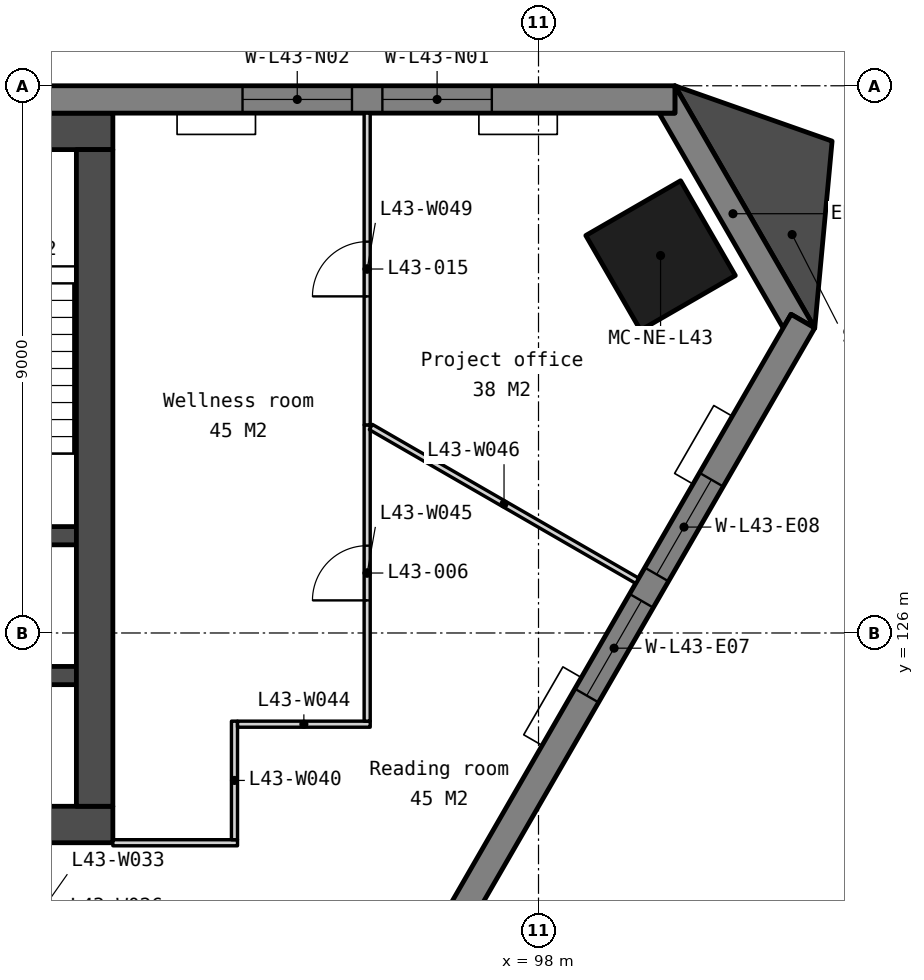
"""IFC4 building model, lengths in metres.
Left out: names, types, materials, properties, quantities, classifications, styles, units other than length and angle.
Written with IfcOpenShell. Run it as: python <this file> out.ifc"""

import sys

from ifc_helpers import new_model, si_unit, direction, frame, frame_2d, origin, origin_2d, place, context, subcontext, project, spatial, polyline, rectangle, outline, extrude, element, fill, save


model = new_model("IFC4")
c1 = context("Model", 3, precision=1e-05, world=origin(), true_north=direction((0.0, 1.0)))
c2 = subcontext(c1, "Body", "Model", "MODEL_VIEW")
j1 = project(units=[si_unit("LENGTHUNIT", "METRE"), si_unit("PLANEANGLEUNIT", "RADIAN")], contexts=[c1])
p1 = place(None, origin())
s1 = spatial("IfcSite", under=j1, at=p1, CompositionType="ELEMENT")
p2 = place(p1, origin())
s2 = spatial("IfcBuilding", under=s1, at=p2, CompositionType="ELEMENT")
p3 = place(p2, frame((0.0, 0.0, 171.5)))
s3 = spatial("IfcBuildingStorey", under=s2, at=p3, CompositionType="ELEMENT", Elevation=171.5)
p4 = place(p3, frame((100.007, 132.208, 0.0), z_axis=(0.0, 0.0, 1.0), x_axis=(-0.5, 0.866025403784, 0.0)))
e1 = element("IfcColumn", 1, at=p4, inside=s3, PredefinedType="COLUMN", context=c2, shape_type="SweptSolid", body=[
    extrude(rectangle(XDim=1.8, YDim=1.8, at=origin_2d()), origin(), (0.0, 0.0, 1.0), 3.9),
])
p5 = place(p3, frame((69.0, 134.25, 0.0), z_axis=(0.0, 0.0, 1.0), x_axis=(1.0, 0.0, 0.0)))
e2 = element("IfcWall", 2, at=p5, inside=s3, PredefinedType="SOLIDWALL", context=c2, shape_type="SweptSolid", body=[
    extrude(rectangle(XDim=22.0, YDim=0.6, at=frame_2d((11.0, 0.0))), origin(), (0.0, 0.0, 1.0), 3.65),
])
p6 = place(p3, frame((69.0, 122.85, 0.0), z_axis=(0.0, 0.0, 1.0), x_axis=(1.0, 0.0, 0.0)))
e3 = element("IfcWall", 3, at=p6, inside=s3, PredefinedType="SOLIDWALL", context=c2, shape_type="SweptSolid", body=[
    extrude(rectangle(XDim=22.0, YDim=0.6, at=frame_2d((11.0, 0.0))), origin(), (0.0, 0.0, 1.0), 3.65),
])
p7 = place(p6, frame((16.375, 0.0, 0.0)))
e4 = element("IfcOpeningElement", 4, at=p7, cuts=e3, PredefinedType="OPENING", context=c2, shape_type="SweptSolid", body=[
    extrude(rectangle(XDim=1.8, YDim=2.1, at=frame_2d((0.9, 1.05))), frame((0.0, 0.31, 0.0), z_axis=(0.0, -1.0, 0.0), x_axis=(1.0, 0.0, 0.0)), (0.0, 0.0, 1.0), 0.62),
])
p8 = place(p6, frame((3.825, 0.0, 0.0)))
e5 = element("IfcOpeningElement", 5, at=p8, cuts=e3, PredefinedType="OPENING", context=c2, shape_type="SweptSolid", body=[
    extrude(rectangle(XDim=1.8, YDim=2.1, at=frame_2d((0.9, 1.05))), frame((0.0, 0.31, 0.0), z_axis=(0.0, -1.0, 0.0), x_axis=(1.0, 0.0, 0.0)), (0.0, 0.0, 1.0), 0.62),
])
p9 = place(p6, frame((12.85, 0.0, 0.0)))
e6 = element("IfcOpeningElement", 6, at=p9, cuts=e3, PredefinedType="OPENING", context=c2, shape_type="SweptSolid", body=[
    extrude(rectangle(XDim=1.5, YDim=2.1, at=frame_2d((0.75, 1.05))), frame((0.0, 0.31, 0.0), z_axis=(0.0, -1.0, 0.0), x_axis=(1.0, 0.0, 0.0)), (0.0, 0.0, 1.0), 0.62),
])
for number, where, z_axis, x_axis in (
    (7, (87.85, 127.6, 0.0), (0.0, 0.0, 1.0), (1.0, 0.0, 0.0)),
    (8, (87.85, 125.3, 0.0), (0.0, 0.0, 1.0), (1.0, 0.0, 0.0)),
):
    element("IfcWall", number, at=place(p3, frame(where, z_axis=z_axis, x_axis=x_axis)), inside=s3, PredefinedType="SOLIDWALL", context=c2, shape_type="SweptSolid", body=[
        extrude(rectangle(XDim=2.55, YDim=0.3, at=frame_2d((1.275, 0.0))), origin(), (0.0, 0.0, 1.0), 3.65),
    ])
p10 = place(p3, frame((90.7, 133.95, 0.0), z_axis=(0.0, 0.0, 1.0), x_axis=(0.0, -1.0, 0.0)))
e9 = element("IfcWall", 9, at=p10, inside=s3, PredefinedType="SOLIDWALL", context=c2, shape_type="SweptSolid", body=[
    extrude(rectangle(XDim=10.8, YDim=0.6, at=frame_2d((5.4, 0.0))), origin(), (0.0, 0.0, 1.0), 3.65),
])
p11 = place(p3, frame((0.0, 0.0, -0.15)))
e10 = element("IfcWall", 10, at=p11, inside=s3, PredefinedType="SOLIDWALL", context=c2, shape_type="SweptSolid", body=[
    extrude(outline(polyline([(102.543, 131.016), (102.153, 131.241), (102.023, 131.016), (99.983, 134.55), (100.243, 134.55), (100.243, 135.0), (102.543, 131.016)])), origin(), (0.0, 0.0, 1.0), 3.8),
])
p12 = place(p3, frame((100.243, 134.775, -0.15), z_axis=(0.0, 0.0, 1.0), x_axis=(-1.0, 0.0, 0.0)))
e11 = element("IfcWall", 11, at=p12, inside=s3, PredefinedType="SOLIDWALL", context=c2, shape_type="SweptSolid", body=[
    extrude(outline(polyline([(40.486, 0.0), (40.486, 3.8), (0.0, 3.8), (0.0, 0.0), (40.486, 0.0)])), frame((0.0, 0.225, 0.0), z_axis=(0.0, -1.0, 0.0), x_axis=(1.0, 0.0, 0.0)), (0.0, 0.0, 1.0), 0.45),
])
p13 = place(p12, frame((3.011, 0.0, 0.95)))
e12 = element("IfcOpeningElement", 12, at=p13, cuts=e11, PredefinedType="OPENING", context=c2, shape_type="SweptSolid", body=[
    extrude(rectangle(XDim=1.8, YDim=2.2, at=frame_2d((0.9, 1.1))), frame((0.0, 0.235, 0.0), z_axis=(0.0, -1.0, 0.0), x_axis=(1.0, 0.0, 0.0)), (0.0, 0.0, 1.0), 0.47),
])
p14 = place(p12, frame((5.311, 0.0, 0.95)))
e13 = element("IfcOpeningElement", 13, at=p14, cuts=e11, PredefinedType="OPENING", context=c2, shape_type="SweptSolid", body=[
    extrude(rectangle(XDim=1.8, YDim=2.2, at=frame_2d((0.9, 1.1))), frame((0.0, 0.235, 0.0), z_axis=(0.0, -1.0, 0.0), x_axis=(1.0, 0.0, 0.0)), (0.0, 0.0, 1.0), 0.47),
])
p15 = place(p12, frame((13.132, 0.0, 0.95)))
e14 = element("IfcOpeningElement", 14, at=p15, cuts=e11, PredefinedType="OPENING", context=c2, shape_type="SweptSolid", body=[
    extrude(rectangle(XDim=1.8, YDim=2.2, at=frame_2d((0.9, 1.1))), frame((0.0, 0.235, 0.0), z_axis=(0.0, -1.0, 0.0), x_axis=(1.0, 0.0, 0.0)), (0.0, 0.0, 1.0), 0.47),
])
p16 = place(p12, frame((15.432, 0.0, 0.95)))
e15 = element("IfcOpeningElement", 15, at=p16, cuts=e11, PredefinedType="OPENING", context=c2, shape_type="SweptSolid", body=[
    extrude(rectangle(XDim=1.8, YDim=2.2, at=frame_2d((0.9, 1.1))), frame((0.0, 0.235, 0.0), z_axis=(0.0, -1.0, 0.0), x_axis=(1.0, 0.0, 0.0)), (0.0, 0.0, 1.0), 0.47),
])
p17 = place(p12, frame((23.254, 0.0, 0.95)))
e16 = element("IfcOpeningElement", 16, at=p17, cuts=e11, PredefinedType="OPENING", context=c2, shape_type="SweptSolid", body=[
    extrude(rectangle(XDim=1.8, YDim=2.2, at=frame_2d((0.9, 1.1))), frame((0.0, 0.235, 0.0), z_axis=(0.0, -1.0, 0.0), x_axis=(1.0, 0.0, 0.0)), (0.0, 0.0, 1.0), 0.47),
])
p18 = place(p12, frame((25.554, 0.0, 0.95)))
e17 = element("IfcOpeningElement", 17, at=p18, cuts=e11, PredefinedType="OPENING", context=c2, shape_type="SweptSolid", body=[
    extrude(rectangle(XDim=1.8, YDim=2.2, at=frame_2d((0.9, 1.1))), frame((0.0, 0.235, 0.0), z_axis=(0.0, -1.0, 0.0), x_axis=(1.0, 0.0, 0.0)), (0.0, 0.0, 1.0), 0.47),
])
p19 = place(p12, frame((33.375, 0.0, 0.95)))
e18 = element("IfcOpeningElement", 18, at=p19, cuts=e11, PredefinedType="OPENING", context=c2, shape_type="SweptSolid", body=[
    extrude(rectangle(XDim=1.8, YDim=2.2, at=frame_2d((0.9, 1.1))), frame((0.0, 0.235, 0.0), z_axis=(0.0, -1.0, 0.0), x_axis=(1.0, 0.0, 0.0)), (0.0, 0.0, 1.0), 0.47),
])
p20 = place(p12, frame((35.675, 0.0, 0.95)))
e19 = element("IfcOpeningElement", 19, at=p20, cuts=e11, PredefinedType="OPENING", context=c2, shape_type="SweptSolid", body=[
    extrude(rectangle(XDim=1.8, YDim=2.2, at=frame_2d((0.9, 1.1))), frame((0.0, 0.235, 0.0), z_axis=(0.0, -1.0, 0.0), x_axis=(1.0, 0.0, 0.0)), (0.0, 0.0, 1.0), 0.47),
])
p21 = place(p3, frame((82.105, 96.067, -0.15), z_axis=(0.0, 0.0, 1.0), x_axis=(0.499997369791, 0.866026922331, 0.0)))
e20 = element("IfcWall", 20, at=p21, inside=s3, PredefinedType="SOLIDWALL", context=c2, shape_type="SweptSolid", body=[
    extrude(outline(polyline([(40.486, 0.0), (40.486, 3.8), (0.0, 3.8), (0.0, 0.0), (40.486, 0.0)])), frame((0.0, 0.225, 0.0), z_axis=(0.0, -1.0, 0.0), x_axis=(1.0, 0.0, 0.0)), (0.0, 0.0, 1.0), 0.45),
])
p22 = place(p21, frame((3.011, 0.0, 0.95)))
e21 = element("IfcOpeningElement", 21, at=p22, cuts=e20, PredefinedType="OPENING", context=c2, shape_type="SweptSolid", body=[
    extrude(rectangle(XDim=1.8, YDim=2.2, at=frame_2d((0.9, 1.1))), frame((0.0, 0.235, 0.0), z_axis=(0.0, -1.0, 0.0), x_axis=(1.0, 0.0, 0.0)), (0.0, 0.0, 1.0), 0.47),
])
p23 = place(p21, frame((5.311, 0.0, 0.95)))
e22 = element("IfcOpeningElement", 22, at=p23, cuts=e20, PredefinedType="OPENING", context=c2, shape_type="SweptSolid", body=[
    extrude(rectangle(XDim=1.8, YDim=2.2, at=frame_2d((0.9, 1.1))), frame((0.0, 0.235, 0.0), z_axis=(0.0, -1.0, 0.0), x_axis=(1.0, 0.0, 0.0)), (0.0, 0.0, 1.0), 0.47),
])
p24 = place(p21, frame((13.132, 0.0, 0.95)))
e23 = element("IfcOpeningElement", 23, at=p24, cuts=e20, PredefinedType="OPENING", context=c2, shape_type="SweptSolid", body=[
    extrude(rectangle(XDim=1.8, YDim=2.2, at=frame_2d((0.9, 1.1))), frame((0.0, 0.235, 0.0), z_axis=(0.0, -1.0, 0.0), x_axis=(1.0, 0.0, 0.0)), (0.0, 0.0, 1.0), 0.47),
])
p25 = place(p21, frame((15.432, 0.0, 0.95)))
e24 = element("IfcOpeningElement", 24, at=p25, cuts=e20, PredefinedType="OPENING", context=c2, shape_type="SweptSolid", body=[
    extrude(rectangle(XDim=1.8, YDim=2.2, at=frame_2d((0.9, 1.1))), frame((0.0, 0.235, 0.0), z_axis=(0.0, -1.0, 0.0), x_axis=(1.0, 0.0, 0.0)), (0.0, 0.0, 1.0), 0.47),
])
p26 = place(p21, frame((23.254, 0.0, 0.95)))
e25 = element("IfcOpeningElement", 25, at=p26, cuts=e20, PredefinedType="OPENING", context=c2, shape_type="SweptSolid", body=[
    extrude(rectangle(XDim=1.8, YDim=2.2, at=frame_2d((0.9, 1.1))), frame((0.0, 0.235, 0.0), z_axis=(0.0, -1.0, 0.0), x_axis=(1.0, 0.0, 0.0)), (0.0, 0.0, 1.0), 0.47),
])
p27 = place(p21, frame((25.554, 0.0, 0.95)))
e26 = element("IfcOpeningElement", 26, at=p27, cuts=e20, PredefinedType="OPENING", context=c2, shape_type="SweptSolid", body=[
    extrude(rectangle(XDim=1.8, YDim=2.2, at=frame_2d((0.9, 1.1))), frame((0.0, 0.235, 0.0), z_axis=(0.0, -1.0, 0.0), x_axis=(1.0, 0.0, 0.0)), (0.0, 0.0, 1.0), 0.47),
])
p28 = place(p21, frame((33.375, 0.0, 0.95)))
e27 = element("IfcOpeningElement", 27, at=p28, cuts=e20, PredefinedType="OPENING", context=c2, shape_type="SweptSolid", body=[
    extrude(rectangle(XDim=1.8, YDim=2.2, at=frame_2d((0.9, 1.1))), frame((0.0, 0.235, 0.0), z_axis=(0.0, -1.0, 0.0), x_axis=(1.0, 0.0, 0.0)), (0.0, 0.0, 1.0), 0.47),
])
p29 = place(p21, frame((35.675, 0.0, 0.95)))
e28 = element("IfcOpeningElement", 28, at=p29, cuts=e20, PredefinedType="OPENING", context=c2, shape_type="SweptSolid", body=[
    extrude(rectangle(XDim=1.8, YDim=2.2, at=frame_2d((0.9, 1.1))), frame((0.0, 0.235, 0.0), z_axis=(0.0, -1.0, 0.0), x_axis=(1.0, 0.0, 0.0)), (0.0, 0.0, 1.0), 0.47),
])
p30 = place(p3, frame((0.0, 0.0, -0.15)))
e29 = element("IfcWall", 29, at=p30, inside=s3, PredefinedType="SOLIDWALL", context=c2, shape_type="SweptSolid", body=[
    extrude(outline(polyline([(102.543, 131.016), (102.828, 134.09), (100.243, 135.0), (102.543, 131.016)])), origin(), (0.0, 0.0, 1.0), 3.8),
])
p31 = place(p3, frame((87.557, 122.137, 0.0), z_axis=(0.0, 0.0, 1.0), x_axis=(0.866029768103, -0.499992440702, 0.0)))
e30 = element("IfcWall", 30, at=p31, inside=s3, PredefinedType="PARTITIONING", context=c2, shape_type="SweptSolid", body=[
    extrude(rectangle(XDim=8.089, YDim=0.1, at=frame_2d((4.044, 0.0))), origin(), (0.0, 0.0, 1.0), 3.65),
])
p32 = place(p31, frame((3.594, 0.0, 0.0)))
e31 = element("IfcOpeningElement", 31, at=p32, cuts=e30, PredefinedType="OPENING", context=c2, shape_type="SweptSolid", body=[
    extrude(rectangle(XDim=0.9, YDim=2.1, at=frame_2d((0.45, 1.05))), frame((0.0, 0.06, 0.0), z_axis=(0.0, -1.0, 0.0), x_axis=(1.0, 0.0, 0.0)), (0.0, 0.0, 1.0), 0.12),
])
p33 = place(p3, frame((91.0, 122.55, 0.0), z_axis=(0.0, 0.0, 1.0), x_axis=(1.0, 0.0, 0.0)))
e32 = element("IfcWall", 32, at=p33, inside=s3, PredefinedType="PARTITIONING", context=c2, shape_type="SweptSolid", body=[
    extrude(rectangle(XDim=2.05, YDim=0.1, at=frame_2d((1.025, 0.0))), origin(), (0.0, 0.0, 1.0), 3.65),
])
p34 = place(p3, frame((93.0, 122.6, 0.0), z_axis=(0.0, 0.0, 1.0), x_axis=(0.0, 1.0, 0.0)))
e33 = element("IfcWall", 33, at=p34, inside=s3, PredefinedType="PARTITIONING", context=c2, shape_type="SweptSolid", body=[
    extrude(rectangle(XDim=1.95, YDim=0.1, at=frame_2d((0.975, 0.0))), origin(), (0.0, 0.0, 1.0), 3.65),
])
p35 = place(p3, frame((93.05, 124.5, 0.0), z_axis=(0.0, 0.0, 1.0), x_axis=(1.0, 0.0, 0.0)))
e34 = element("IfcWall", 34, at=p35, inside=s3, PredefinedType="PARTITIONING", context=c2, shape_type="SweptSolid", body=[
    extrude(rectangle(XDim=2.182, YDim=0.1, at=frame_2d((1.091, 0.0))), origin(), (0.0, 0.0, 1.0), 3.65),
])
p36 = place(p3, frame((95.182, 124.55, 0.0), z_axis=(0.0, 0.0, 1.0), x_axis=(0.0, 1.0, 0.0)))
e35 = element("IfcWall", 35, at=p36, inside=s3, PredefinedType="PARTITIONING", context=c2, shape_type="SweptSolid", body=[
    extrude(rectangle(XDim=4.872, YDim=0.1, at=frame_2d((2.436, 0.0))), origin(), (0.0, 0.0, 1.0), 3.65),
])
p37 = place(p36, frame((1.986, 0.0, 0.0)))
e36 = element("IfcOpeningElement", 36, at=p37, cuts=e35, PredefinedType="OPENING", context=c2, shape_type="SweptSolid", body=[
    extrude(rectangle(XDim=0.9, YDim=2.1, at=frame_2d((0.45, 1.05))), frame((0.0, 0.06, 0.0), z_axis=(0.0, -1.0, 0.0), x_axis=(1.0, 0.0, 0.0)), (0.0, 0.0, 1.0), 0.12),
])
p38 = place(p3, frame((95.243, 129.387, 0.0), z_axis=(0.0, 0.0, 1.0), x_axis=(0.866030444867, -0.499991268487, 0.0)))
e37 = element("IfcWall", 37, at=p38, inside=s3, PredefinedType="PARTITIONING", context=c2, shape_type="SweptSolid", body=[
    extrude(rectangle(XDim=5.058, YDim=0.1, at=frame_2d((2.529, 0.0))), origin(), (0.0, 0.0, 1.0), 3.65),
])
p39 = place(p3, frame((95.182, 129.422, 0.0), z_axis=(0.0, 0.0, 1.0), x_axis=(0.0, 1.0, 0.0)))
e38 = element("IfcWall", 38, at=p39, inside=s3, PredefinedType="PARTITIONING", context=c2, shape_type="SweptSolid", body=[
    extrude(rectangle(XDim=5.128, YDim=0.1, at=frame_2d((2.564, 0.0))), origin(), (0.0, 0.0, 1.0), 3.65),
])
p40 = place(p39, frame((2.114, 0.0, 0.0)))
e39 = element("IfcOpeningElement", 39, at=p40, cuts=e38, PredefinedType="OPENING", context=c2, shape_type="SweptSolid", body=[
    extrude(rectangle(XDim=0.9, YDim=2.1, at=frame_2d((0.45, 1.05))), frame((0.0, 0.06, 0.0), z_axis=(0.0, -1.0, 0.0), x_axis=(1.0, 0.0, 0.0)), (0.0, 0.0, 1.0), 0.12),
])
p41 = place(p13, origin())
e40 = element("IfcWindow", 40, at=p41, inside=s3, PartitioningType="SINGLE_PANEL", PredefinedType="WINDOW", context=c2, shape_type="SweptSolid", body=[
    extrude(rectangle(XDim=1.8, YDim=2.2, at=frame_2d((0.9, 1.1))), frame((0.0, 0.03, 0.0), z_axis=(0.0, -1.0, 0.0), x_axis=(1.0, 0.0, 0.0)), (0.0, 0.0, 1.0), 0.06),
])
fill(e12, e40)
p42 = place(p14, origin())
e41 = element("IfcWindow", 41, at=p42, inside=s3, PartitioningType="SINGLE_PANEL", PredefinedType="WINDOW", context=c2, shape_type="SweptSolid", body=[
    extrude(rectangle(XDim=1.8, YDim=2.2, at=frame_2d((0.9, 1.1))), frame((0.0, 0.03, 0.0), z_axis=(0.0, -1.0, 0.0), x_axis=(1.0, 0.0, 0.0)), (0.0, 0.0, 1.0), 0.06),
])
fill(e13, e41)
p43 = place(p28, origin())
e42 = element("IfcWindow", 42, at=p43, inside=s3, PartitioningType="SINGLE_PANEL", PredefinedType="WINDOW", context=c2, shape_type="SweptSolid", body=[
    extrude(rectangle(XDim=1.8, YDim=2.2, at=frame_2d((0.9, 1.1))), frame((0.0, 0.03, 0.0), z_axis=(0.0, -1.0, 0.0), x_axis=(1.0, 0.0, 0.0)), (0.0, 0.0, 1.0), 0.06),
])
fill(e27, e42)
p44 = place(p29, origin())
e43 = element("IfcWindow", 43, at=p44, inside=s3, PartitioningType="SINGLE_PANEL", PredefinedType="WINDOW", context=c2, shape_type="SweptSolid", body=[
    extrude(rectangle(XDim=1.8, YDim=2.2, at=frame_2d((0.9, 1.1))), frame((0.0, 0.03, 0.0), z_axis=(0.0, -1.0, 0.0), x_axis=(1.0, 0.0, 0.0)), (0.0, 0.0, 1.0), 0.06),
])
fill(e28, e43)
p45 = place(p37, origin())
e44 = element("IfcDoor", 44, at=p45, inside=s3, OperationType="SINGLE_SWING_LEFT", PredefinedType="DOOR", context=c2, shape_type="SweptSolid", body=[
    extrude(rectangle(XDim=0.9, YDim=2.1, at=frame_2d((0.45, 1.05))), frame((0.0, 0.025, 0.0), z_axis=(0.0, -1.0, 0.0), x_axis=(1.0, 0.0, 0.0)), (0.0, 0.0, 1.0), 0.05),
])
fill(e36, e44)
p46 = place(p40, origin())
e45 = element("IfcDoor", 45, at=p46, inside=s3, OperationType="SINGLE_SWING_LEFT", PredefinedType="DOOR", context=c2, shape_type="SweptSolid", body=[
    extrude(rectangle(XDim=0.9, YDim=2.1, at=frame_2d((0.45, 1.05))), frame((0.0, 0.025, 0.0), z_axis=(0.0, -1.0, 0.0), x_axis=(1.0, 0.0, 0.0)), (0.0, 0.0, 1.0), 0.05),
])
fill(e39, e45)
save(model, sys.argv[1])
